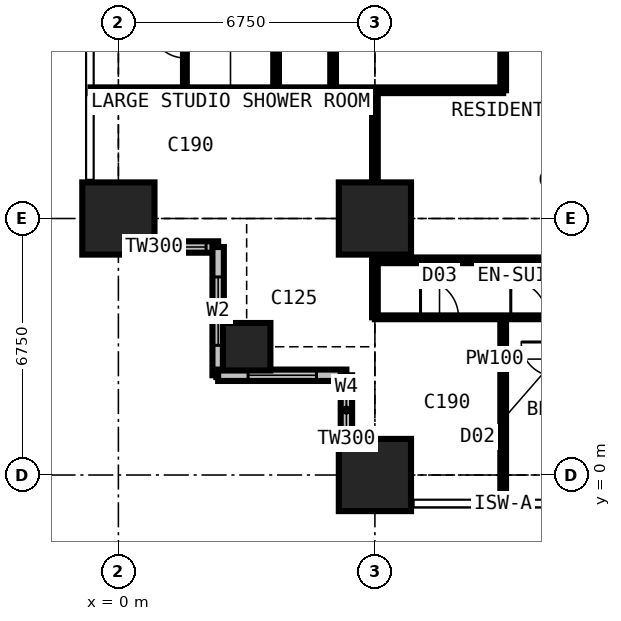
"""IFC4 building model, lengths in metres.
Left out: names, types, materials, properties, quantities, classifications, styles, units other than length and angle.
Written with IfcOpenShell. Run it as: python <this file> out.ifc"""

import sys

from ifc_helpers import new_model, si_unit, direction, frame, frame_2d, origin, origin_2d, place, context, subcontext, project, spatial, rectangle, extrude, element, fill, save


model = new_model("IFC4")
c1 = context("Model", 3, precision=1e-05, world=origin(), true_north=direction((0.0, 1.0)))
c2 = subcontext(c1, "Body", "Model", "MODEL_VIEW")
j1 = project(units=[si_unit("LENGTHUNIT", "METRE"), si_unit("PLANEANGLEUNIT", "RADIAN")], contexts=[c1])
p1 = place(None, origin())
s1 = spatial("IfcSite", under=j1, at=p1, CompositionType="ELEMENT")
p2 = place(p1, origin())
s2 = spatial("IfcBuilding", under=s1, at=p2, CompositionType="ELEMENT")
p3 = place(p2, frame((0.0, 0.0, 18.0)))
s3 = spatial("IfcBuildingStorey", under=s2, at=p3, CompositionType="ELEMENT", Elevation=18.0)
p4 = place(p3, frame((0.0, 6.75, 0.0), z_axis=(0.0, 0.0, 1.0), x_axis=(1.0, 0.0, 0.0)))
e1 = element("IfcColumn", 1, at=p4, inside=s3, PredefinedType="COLUMN", context=c2, shape_type="SweptSolid", body=[
    extrude(rectangle(XDim=1.9, YDim=1.9, at=origin_2d()), origin(), (0.0, 0.0, 1.0), 3.6),
])
p5 = place(p3, frame((3.375, 3.375, 0.0), z_axis=(0.0, 0.0, 1.0), x_axis=(1.0, 0.0, 0.0)))
e2 = element("IfcColumn", 2, at=p5, inside=s3, PredefinedType="COLUMN", context=c2, shape_type="SweptSolid", body=[
    extrude(rectangle(XDim=1.25, YDim=1.25, at=origin_2d()), origin(), (0.0, 0.0, 1.0), 3.6),
])
for number, where, z_axis, x_axis in (
    (3, (6.75, 0.0, 0.0), (0.0, 0.0, 1.0), (1.0, 0.0, 0.0)),
    (4, (6.75, 6.75, 0.0), (0.0, 0.0, 1.0), (1.0, 0.0, 0.0)),
):
    element("IfcColumn", number, at=place(p3, frame(where, z_axis=z_axis, x_axis=x_axis)), inside=s3, PredefinedType="COLUMN", context=c2, shape_type="SweptSolid", body=[
        extrude(rectangle(XDim=1.9, YDim=1.9, at=origin_2d()), origin(), (0.0, 0.0, 1.0), 3.6),
    ])
p6 = place(p3, frame((-0.75, 6.0, 0.0), z_axis=(0.0, 0.0, 1.0), x_axis=(1.0, 0.0, 0.0)))
e5 = element("IfcWall", 5, at=p6, inside=s3, PredefinedType="SOLIDWALL", context=c2, shape_type="SweptSolid", body=[
    extrude(rectangle(XDim=3.375, YDim=0.3, at=frame_2d((1.688, 0.0))), origin(), (0.0, 0.0, 1.0), 3.375),
])
p7 = place(p6, frame((1.857, 0.0, 0.9)))
e6 = element("IfcOpeningElement", 6, at=p7, cuts=e5, PredefinedType="OPENING", context=c2, shape_type="SweptSolid", body=[
    extrude(rectangle(XDim=1.2, YDim=1.8, at=frame_2d((0.6, 0.9))), frame((0.0, 0.16, 0.0), z_axis=(0.0, -1.0, 0.0), x_axis=(1.0, 0.0, 0.0)), (0.0, 0.0, 1.0), 0.32),
])
p8 = place(p3, frame((2.625, 6.0, 0.0), z_axis=(0.0, 0.0, 1.0), x_axis=(0.0, -1.0, 0.0)))
e7 = element("IfcWall", 7, at=p8, inside=s3, PredefinedType="SOLIDWALL", context=c2, shape_type="SweptSolid", body=[
    extrude(rectangle(XDim=3.375, YDim=0.3, at=frame_2d((1.688, 0.0))), origin(), (0.0, 0.0, 1.0), 3.375),
])
p9 = place(p8, frame((0.788, 0.0, 0.6)))
e8 = element("IfcOpeningElement", 8, at=p9, cuts=e7, PredefinedType="OPENING", context=c2, shape_type="SweptSolid", body=[
    extrude(rectangle(XDim=1.8, YDim=2.1, at=frame_2d((0.9, 1.05))), frame((0.0, 0.16, 0.0), z_axis=(0.0, -1.0, 0.0), x_axis=(1.0, 0.0, 0.0)), (0.0, 0.0, 1.0), 0.32),
])
p10 = place(p3, frame((2.625, 2.625, 0.0), z_axis=(0.0, 0.0, 1.0), x_axis=(1.0, 0.0, 0.0)))
e9 = element("IfcWall", 9, at=p10, inside=s3, PredefinedType="SOLIDWALL", context=c2, shape_type="SweptSolid", body=[
    extrude(rectangle(XDim=3.375, YDim=0.3, at=frame_2d((1.688, 0.0))), origin(), (0.0, 0.0, 1.0), 3.375),
])
p11 = place(p10, frame((0.788, 0.0, 0.6)))
e10 = element("IfcOpeningElement", 10, at=p11, cuts=e9, PredefinedType="OPENING", context=c2, shape_type="SweptSolid", body=[
    extrude(rectangle(XDim=1.8, YDim=2.1, at=frame_2d((0.9, 1.05))), frame((0.0, 0.16, 0.0), z_axis=(0.0, -1.0, 0.0), x_axis=(1.0, 0.0, 0.0)), (0.0, 0.0, 1.0), 0.32),
])
p12 = place(p3, frame((6.0, 2.625, 0.0), z_axis=(0.0, 0.0, 1.0), x_axis=(0.0, -1.0, 0.0)))
e11 = element("IfcWall", 11, at=p12, inside=s3, PredefinedType="SOLIDWALL", context=c2, shape_type="SweptSolid", body=[
    extrude(rectangle(XDim=3.375, YDim=0.3, at=frame_2d((1.688, 0.0))), origin(), (0.0, 0.0, 1.0), 3.375),
])
p13 = place(p12, frame((0.317, 0.0, 0.9)))
e12 = element("IfcOpeningElement", 12, at=p13, cuts=e11, PredefinedType="OPENING", context=c2, shape_type="SweptSolid", body=[
    extrude(rectangle(XDim=1.2, YDim=1.8, at=frame_2d((0.6, 0.9))), frame((0.0, 0.16, 0.0), z_axis=(0.0, -1.0, 0.0), x_axis=(1.0, 0.0, 0.0)), (0.0, 0.0, 1.0), 0.32),
])
p14 = place(p3, frame((-0.734, 10.125, 0.0), z_axis=(0.0, 0.0, 1.0), x_axis=(1.0, 0.0, 0.0)))
e13 = element("IfcWall", 13, at=p14, inside=s3, PredefinedType="PARTITIONING", context=c2, shape_type="SweptSolid", body=[
    extrude(rectangle(XDim=10.859, YDim=0.15, at=frame_2d((5.429, 0.0))), origin(), (0.0, 0.0, 1.0), 3.375),
])
p15 = place(p3, frame((1.75, 10.125, 0.0), z_axis=(0.0, 0.0, 1.0), x_axis=(0.0, 1.0, 0.0)))
e14 = element("IfcWall", 14, at=p15, inside=s3, PredefinedType="PARTITIONING", context=c2, shape_type="SweptSolid", body=[
    extrude(rectangle(XDim=2.6, YDim=0.1, at=frame_2d((1.3, 0.0))), origin(), (0.0, 0.0, 1.0), 3.375),
])
p16 = place(p15, frame((0.85, 0.0, 0.0)))
e15 = element("IfcOpeningElement", 15, at=p16, cuts=e14, PredefinedType="OPENING", context=c2, shape_type="SweptSolid", body=[
    extrude(rectangle(XDim=0.9, YDim=2.2, at=frame_2d((0.45, 1.1))), frame((0.0, 0.06, 0.0), z_axis=(0.0, -1.0, 0.0), x_axis=(1.0, 0.0, 0.0)), (0.0, 0.0, 1.0), 0.12),
])
p17 = place(p3, frame((4.15, 10.125, 0.0), z_axis=(0.0, 0.0, 1.0), x_axis=(0.0, 1.0, 0.0)))
e16 = element("IfcWall", 16, at=p17, inside=s3, PredefinedType="PARTITIONING", context=c2, shape_type="SweptSolid", body=[
    extrude(rectangle(XDim=23.625, YDim=0.15, at=frame_2d((11.812, 0.0))), origin(), (0.0, 0.0, 1.0), 3.375),
])
p18 = place(p17, frame((4.2, 0.0, 0.0)))
e17 = element("IfcOpeningElement", 17, at=p18, cuts=e16, PredefinedType="OPENING", context=c2, shape_type="SweptSolid", body=[
    extrude(rectangle(XDim=0.95, YDim=2.2, at=frame_2d((0.475, 1.1))), frame((0.0, 0.085, 0.0), z_axis=(0.0, -1.0, 0.0), x_axis=(1.0, 0.0, 0.0)), (0.0, 0.0, 1.0), 0.17),
])
p19 = place(p17, frame((10.95, 0.0, 0.0)))
e18 = element("IfcOpeningElement", 18, at=p19, cuts=e16, PredefinedType="OPENING", context=c2, shape_type="SweptSolid", body=[
    extrude(rectangle(XDim=0.95, YDim=2.2, at=frame_2d((0.475, 1.1))), frame((0.0, 0.085, 0.0), z_axis=(0.0, -1.0, 0.0), x_axis=(1.0, 0.0, 0.0)), (0.0, 0.0, 1.0), 0.17),
])
p20 = place(p17, frame((17.7, 0.0, 0.0)))
e19 = element("IfcOpeningElement", 19, at=p20, cuts=e16, PredefinedType="OPENING", context=c2, shape_type="SweptSolid", body=[
    extrude(rectangle(XDim=0.95, YDim=2.2, at=frame_2d((0.475, 1.1))), frame((0.0, 0.085, 0.0), z_axis=(0.0, -1.0, 0.0), x_axis=(1.0, 0.0, 0.0)), (0.0, 0.0, 1.0), 0.17),
])
p21 = place(p3, frame((5.65, 10.125, 0.0), z_axis=(0.0, 0.0, 1.0), x_axis=(0.0, 1.0, 0.0)))
e20 = element("IfcWall", 20, at=p21, inside=s3, PredefinedType="PARTITIONING", context=c2, shape_type="SweptSolid", body=[
    extrude(rectangle(XDim=10.762, YDim=0.15, at=frame_2d((5.381, 0.0))), origin(), (0.0, 0.0, 1.0), 3.375),
])
p22 = place(p21, frame((4.9, 0.0, 0.0)))
e21 = element("IfcOpeningElement", 21, at=p22, cuts=e20, PredefinedType="OPENING", context=c2, shape_type="SweptSolid", body=[
    extrude(rectangle(XDim=0.95, YDim=2.2, at=frame_2d((0.475, 1.1))), frame((0.0, 0.085, 0.0), z_axis=(0.0, -1.0, 0.0), x_axis=(1.0, 0.0, 0.0)), (0.0, 0.0, 1.0), 0.17),
])
p23 = place(p3, frame((6.75, 4.15, 0.0), z_axis=(0.0, 0.0, 1.0), x_axis=(0.0, 1.0, 0.0)))
e22 = element("IfcWall", 22, at=p23, inside=s3, PredefinedType="PARTITIONING", context=c2, shape_type="SweptSolid", body=[
    extrude(rectangle(XDim=5.975, YDim=0.15, at=frame_2d((2.988, 0.0))), origin(), (0.0, 0.0, 1.0), 2.877),
])
p24 = place(p3, frame((6.75, 4.15, 0.0), z_axis=(0.0, 0.0, 1.0), x_axis=(1.0, 0.0, 0.0)))
e23 = element("IfcWall", 23, at=p24, inside=s3, PredefinedType="PARTITIONING", context=c2, shape_type="SweptSolid", body=[
    extrude(rectangle(XDim=23.625, YDim=0.1, at=frame_2d((11.812, 0.0))), origin(), (0.0, 0.0, 1.0), 3.375),
])
p25 = place(p24, frame((1.2, 0.0, 0.0)))
e24 = element("IfcOpeningElement", 24, at=p25, cuts=e23, PredefinedType="OPENING", context=c2, shape_type="SweptSolid", body=[
    extrude(rectangle(XDim=1.0, YDim=2.2, at=frame_2d((0.5, 1.1))), frame((0.0, 0.06, 0.0), z_axis=(0.0, -1.0, 0.0), x_axis=(1.0, 0.0, 0.0)), (0.0, 0.0, 1.0), 0.12),
])
p26 = place(p24, frame((3.575, 0.0, 0.0)))
e25 = element("IfcOpeningElement", 25, at=p26, cuts=e23, PredefinedType="OPENING", context=c2, shape_type="SweptSolid", body=[
    extrude(rectangle(XDim=0.95, YDim=2.2, at=frame_2d((0.475, 1.1))), frame((0.0, 0.06, 0.0), z_axis=(0.0, -1.0, 0.0), x_axis=(1.0, 0.0, 0.0)), (0.0, 0.0, 1.0), 0.12),
])
p27 = place(p24, frame((7.0, 0.0, 0.0)))
e26 = element("IfcOpeningElement", 26, at=p27, cuts=e23, PredefinedType="OPENING", context=c2, shape_type="SweptSolid", body=[
    extrude(rectangle(XDim=0.95, YDim=2.2, at=frame_2d((0.475, 1.1))), frame((0.0, 0.06, 0.0), z_axis=(0.0, -1.0, 0.0), x_axis=(1.0, 0.0, 0.0)), (0.0, 0.0, 1.0), 0.12),
])
p28 = place(p24, frame((10.375, 0.0, 0.0)))
e27 = element("IfcOpeningElement", 27, at=p28, cuts=e23, PredefinedType="OPENING", context=c2, shape_type="SweptSolid", body=[
    extrude(rectangle(XDim=0.95, YDim=2.2, at=frame_2d((0.475, 1.1))), frame((0.0, 0.06, 0.0), z_axis=(0.0, -1.0, 0.0), x_axis=(1.0, 0.0, 0.0)), (0.0, 0.0, 1.0), 0.12),
])
p29 = place(p24, frame((13.7, 0.0, 0.0)))
e28 = element("IfcOpeningElement", 28, at=p29, cuts=e23, PredefinedType="OPENING", context=c2, shape_type="SweptSolid", body=[
    extrude(rectangle(XDim=0.95, YDim=2.2, at=frame_2d((0.475, 1.1))), frame((0.0, 0.06, 0.0), z_axis=(0.0, -1.0, 0.0), x_axis=(1.0, 0.0, 0.0)), (0.0, 0.0, 1.0), 0.12),
])
p30 = place(p24, frame((17.125, 0.0, 0.0)))
e29 = element("IfcOpeningElement", 29, at=p30, cuts=e23, PredefinedType="OPENING", context=c2, shape_type="SweptSolid", body=[
    extrude(rectangle(XDim=0.95, YDim=2.2, at=frame_2d((0.475, 1.1))), frame((0.0, 0.06, 0.0), z_axis=(0.0, -1.0, 0.0), x_axis=(1.0, 0.0, 0.0)), (0.0, 0.0, 1.0), 0.12),
])
p31 = place(p24, frame((20.5, 0.0, 0.0)))
e30 = element("IfcOpeningElement", 30, at=p31, cuts=e23, PredefinedType="OPENING", context=c2, shape_type="SweptSolid", body=[
    extrude(rectangle(XDim=0.95, YDim=2.2, at=frame_2d((0.475, 1.1))), frame((0.0, 0.06, 0.0), z_axis=(0.0, -1.0, 0.0), x_axis=(1.0, 0.0, 0.0)), (0.0, 0.0, 1.0), 0.12),
])
p32 = place(p3, frame((6.75, 5.65, 0.0), z_axis=(0.0, 0.0, 1.0), x_axis=(1.0, 0.0, 0.0)))
e31 = element("IfcWall", 31, at=p32, inside=s3, PredefinedType="PARTITIONING", context=c2, shape_type="SweptSolid", body=[
    extrude(rectangle(XDim=11.05, YDim=0.15, at=frame_2d((5.525, 0.0))), origin(), (0.0, 0.0, 1.0), 3.375),
])
p33 = place(p3, frame((10.125, -0.734, 0.0), z_axis=(0.0, 0.0, 1.0), x_axis=(0.0, 1.0, 0.0)))
e32 = element("IfcWall", 32, at=p33, inside=s3, PredefinedType="PARTITIONING", context=c2, shape_type="SweptSolid", body=[
    extrude(rectangle(XDim=4.884, YDim=0.15, at=frame_2d((2.442, 0.0))), origin(), (0.0, 0.0, 1.0), 3.375),
])
p34 = place(p3, frame((10.125, 10.125, 0.0), z_axis=(0.0, 0.0, 1.0), x_axis=(0.0, 1.0, 0.0)))
e33 = element("IfcWall", 33, at=p34, inside=s3, PredefinedType="PARTITIONING", context=c2, shape_type="SweptSolid", body=[
    extrude(rectangle(XDim=1.175, YDim=0.15, at=frame_2d((0.587, 0.0))), origin(), (0.0, 0.0, 1.0), 3.375),
])
p35 = place(p7, origin())
e34 = element("IfcWindow", 34, at=p35, inside=s3, PartitioningType="SINGLE_PANEL", PredefinedType="WINDOW", context=c2, shape_type="SweptSolid", body=[
    extrude(rectangle(XDim=1.2, YDim=1.8, at=frame_2d((0.6, 0.9))), frame((0.0, 0.03, 0.0), z_axis=(0.0, -1.0, 0.0), x_axis=(1.0, 0.0, 0.0)), (0.0, 0.0, 1.0), 0.06),
])
fill(e6, e34)
p36 = place(p9, origin())
e35 = element("IfcWindow", 35, at=p36, inside=s3, PartitioningType="SINGLE_PANEL", PredefinedType="WINDOW", context=c2, shape_type="SweptSolid", body=[
    extrude(rectangle(XDim=1.8, YDim=2.1, at=frame_2d((0.9, 1.05))), frame((0.0, 0.03, 0.0), z_axis=(0.0, -1.0, 0.0), x_axis=(1.0, 0.0, 0.0)), (0.0, 0.0, 1.0), 0.06),
])
fill(e8, e35)
p37 = place(p11, origin())
e36 = element("IfcWindow", 36, at=p37, inside=s3, PartitioningType="SINGLE_PANEL", PredefinedType="WINDOW", context=c2, shape_type="SweptSolid", body=[
    extrude(rectangle(XDim=1.8, YDim=2.1, at=frame_2d((0.9, 1.05))), frame((0.0, 0.03, 0.0), z_axis=(0.0, -1.0, 0.0), x_axis=(1.0, 0.0, 0.0)), (0.0, 0.0, 1.0), 0.06),
])
fill(e10, e36)
p38 = place(p13, origin())
e37 = element("IfcWindow", 37, at=p38, inside=s3, PartitioningType="SINGLE_PANEL", PredefinedType="WINDOW", context=c2, shape_type="SweptSolid", body=[
    extrude(rectangle(XDim=1.2, YDim=1.8, at=frame_2d((0.6, 0.9))), frame((0.0, 0.03, 0.0), z_axis=(0.0, -1.0, 0.0), x_axis=(1.0, 0.0, 0.0)), (0.0, 0.0, 1.0), 0.06),
])
fill(e12, e37)
p39 = place(p25, origin())
e38 = element("IfcDoor", 38, at=p39, inside=s3, OperationType="SINGLE_SWING_LEFT", PredefinedType="DOOR", context=c2, shape_type="SweptSolid", body=[
    extrude(rectangle(XDim=1.0, YDim=2.2, at=frame_2d((0.5, 1.1))), frame((0.0, 0.025, 0.0), z_axis=(0.0, -1.0, 0.0), x_axis=(1.0, 0.0, 0.0)), (0.0, 0.0, 1.0), 0.05),
])
fill(e24, e38)
p40 = place(p26, origin())
e39 = element("IfcDoor", 39, at=p40, inside=s3, OperationType="SINGLE_SWING_LEFT", PredefinedType="DOOR", context=c2, shape_type="SweptSolid", body=[
    extrude(rectangle(XDim=0.95, YDim=2.2, at=frame_2d((0.475, 1.1))), frame((0.0, 0.025, 0.0), z_axis=(0.0, -1.0, 0.0), x_axis=(1.0, 0.0, 0.0)), (0.0, 0.0, 1.0), 0.05),
])
fill(e25, e39)
p41 = place(p16, origin())
e40 = element("IfcDoor", 40, at=p41, inside=s3, OperationType="SINGLE_SWING_RIGHT", PredefinedType="DOOR", context=c2, shape_type="SweptSolid", body=[
    extrude(rectangle(XDim=0.9, YDim=2.2, at=frame_2d((0.45, 1.1))), frame((0.0, 0.025, 0.0), z_axis=(0.0, -1.0, 0.0), x_axis=(1.0, 0.0, 0.0)), (0.0, 0.0, 1.0), 0.05),
])
fill(e15, e40)
save(model, sys.argv[1])
